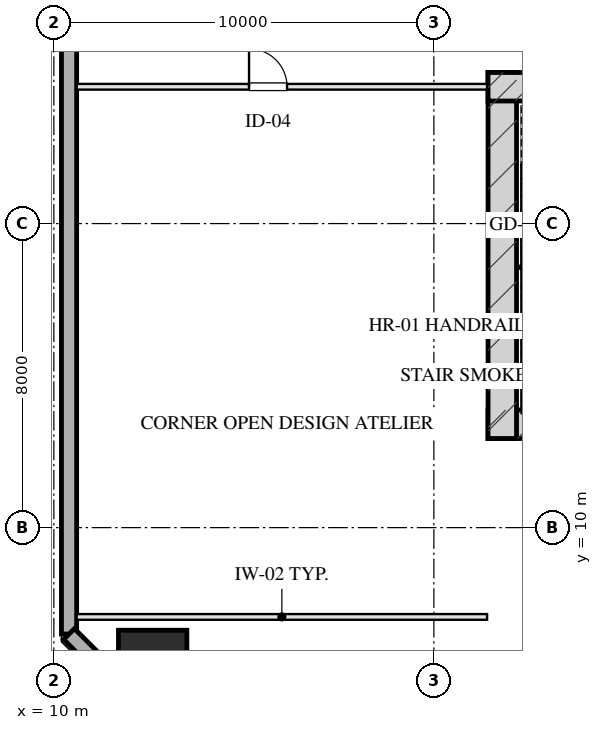
"""IFC4 building model, lengths in metres.
Left out: names, types, materials, properties, quantities, classifications, styles, units other than length and angle.
Written with IfcOpenShell. Run it as: python <this file> out.ifc"""

import sys

from ifc_helpers import new_model, si_unit, direction, frame, frame_2d, origin, origin_2d, place, context, subcontext, project, spatial, rectangle, hollow_rectangle, extrude, element, fill, save


model = new_model("IFC4")
c1 = context("Model", 3, precision=1e-05, world=origin(), true_north=direction((0.0, 1.0)))
c2 = subcontext(c1, "Body", "Model", "MODEL_VIEW")
j1 = project(units=[si_unit("LENGTHUNIT", "METRE"), si_unit("PLANEANGLEUNIT", "RADIAN")], contexts=[c1])
p1 = place(None, origin())
s1 = spatial("IfcSite", under=j1, at=p1, CompositionType="ELEMENT")
p2 = place(p1, origin())
s2 = spatial("IfcBuilding", under=s1, at=p2, CompositionType="ELEMENT")
p3 = place(p2, frame((0.0, 0.0, 78.2)))
s3 = spatial("IfcBuildingStorey", under=s2, at=p3, CompositionType="ELEMENT", Elevation=78.2)
p4 = place(p3, frame((21.425, 12.72, 0.0), z_axis=(0.0, 0.0, 1.0), x_axis=(1.0, 0.0, 0.0)))
e1 = element("IfcWall", 1, at=p4, inside=s3, PredefinedType="SHEAR", context=c2, shape_type="SweptSolid", body=[
    extrude(rectangle(XDim=17.15, YDim=0.75, at=frame_2d((8.575, 0.0))), origin(), (0.0, 0.0, 1.0), 3.45),
])
p5 = place(p3, frame((21.8, 21.975, 0.0), z_axis=(0.0, 0.0, 1.0), x_axis=(0.0, -1.0, 0.0)))
e2 = element("IfcWall", 2, at=p5, inside=s3, PredefinedType="SHEAR", context=c2, shape_type="SweptSolid", body=[
    extrude(rectangle(XDim=9.63, YDim=0.75, at=frame_2d((4.815, 0.0))), origin(), (0.0, 0.0, 1.0), 3.45),
])
p6 = place(p3, frame((21.425, 21.6, 0.0), z_axis=(0.0, 0.0, 1.0), x_axis=(1.0, 0.0, 0.0)))
e3 = element("IfcWall", 3, at=p6, inside=s3, PredefinedType="SHEAR", context=c2, shape_type="SweptSolid", body=[
    extrude(rectangle(XDim=4.295, YDim=0.75, at=frame_2d((2.147, 0.0))), origin(), (0.0, 0.0, 1.0), 3.45),
])
p7 = place(p3, frame((12.6, 6.4, 0.0), z_axis=(0.0, 0.0, 1.0), x_axis=(1.0, 0.0, 0.0)))
e4 = element("IfcColumn", 4, at=p7, inside=s3, PredefinedType="COLUMN", context=c2, shape_type="SweptSolid", body=[
    extrude(hollow_rectangle(XDim=1.8, YDim=1.8, WallThickness=0.06, at=origin_2d()), origin(), (0.0, 0.0, 1.0), 3.451),
])
p8 = place(p3, frame((10.4, 7.2, 0.0), z_axis=(0.0, 0.0, 1.0), x_axis=(0.0, 1.0, 0.0)))
e5 = element("IfcWall", 5, at=p8, inside=s3, PredefinedType="SOLIDWALL", context=c2, shape_type="SweptSolid", body=[
    extrude(rectangle(XDim=53.6, YDim=0.4, at=frame_2d((26.8, 0.0))), origin(), (0.0, 0.0, 1.0), 2.61),
])
p9 = place(p8, frame((19.2, 0.0, 0.75)))
e6 = element("IfcOpeningElement", 6, at=p9, cuts=e5, PredefinedType="OPENING", context=c2, shape_type="SweptSolid", body=[
    extrude(rectangle(XDim=2.4, YDim=1.46, at=frame_2d((1.2, 0.73))), frame((0.0, 0.21, 0.0), z_axis=(0.0, -1.0, 0.0), x_axis=(1.0, 0.0, 0.0)), (0.0, 0.0, 1.0), 0.42),
])
p10 = place(p8, frame((30.65, 0.0, 0.0)))
e7 = element("IfcOpeningElement", 7, at=p10, cuts=e5, PredefinedType="OPENING", context=c2, shape_type="SweptSolid", body=[
    extrude(rectangle(XDim=1.1, YDim=2.15, at=frame_2d((0.55, 1.075))), frame((0.0, 0.21, 0.0), z_axis=(0.0, -1.0, 0.0), x_axis=(1.0, 0.0, 0.0)), (0.0, 0.0, 1.0), 0.42),
])
p11 = place(p3, frame((13.4, 4.2, 0.0), z_axis=(0.0, 0.0, 1.0), x_axis=(-0.707106781187, 0.707106781187, 0.0)))
e8 = element("IfcWall", 8, at=p11, inside=s3, PredefinedType="SOLIDWALL", context=c2, shape_type="SweptSolid", body=[
    extrude(rectangle(XDim=4.243, YDim=0.4, at=frame_2d((2.121, 0.0))), origin(), (0.0, 0.0, 1.0), 2.61),
])
p12 = place(p3, frame((10.6, 7.65, 0.0), z_axis=(0.0, 0.0, 1.0), x_axis=(1.0, 0.0, 0.0)))
e9 = element("IfcWall", 9, at=p12, inside=s3, PredefinedType="PARTITIONING", context=c2, shape_type="SweptSolid", body=[
    extrude(rectangle(XDim=10.8, YDim=0.15, at=frame_2d((5.4, 0.0))), origin(), (0.0, 0.0, 1.0), 3.175),
])
p13 = place(p3, frame((10.6, 21.6, 0.0), z_axis=(0.0, 0.0, 1.0), x_axis=(1.0, 0.0, 0.0)))
e10 = element("IfcWall", 10, at=p13, inside=s3, PredefinedType="PARTITIONING", context=c2, shape_type="SweptSolid", body=[
    extrude(rectangle(XDim=10.8, YDim=0.15, at=frame_2d((5.4, 0.0))), origin(), (0.0, 0.0, 1.0), 3.175),
])
p14 = place(p13, frame((4.536, 0.0, 0.0)))
e11 = element("IfcOpeningElement", 11, at=p14, cuts=e10, PredefinedType="OPENING", context=c2, shape_type="SweptSolid", body=[
    extrude(rectangle(XDim=1.0, YDim=2.05, at=frame_2d((0.5, 1.025))), frame((0.0, 0.085, 0.0), z_axis=(0.0, -1.0, 0.0), x_axis=(1.0, 0.0, 0.0)), (0.0, 0.0, 1.0), 0.17),
])
p15 = place(p14, origin())
e12 = element("IfcDoor", 12, at=p15, inside=s3, OperationType="SINGLE_SWING_LEFT", PredefinedType="DOOR", context=c2, shape_type="SweptSolid", body=[
    extrude(rectangle(XDim=1.0, YDim=2.05, at=frame_2d((0.5, 1.025))), frame((0.0, 0.025, 0.0), z_axis=(0.0, -1.0, 0.0), x_axis=(1.0, 0.0, 0.0)), (0.0, 0.0, 1.0), 0.05),
])
fill(e11, e12)
save(model, sys.argv[1])
